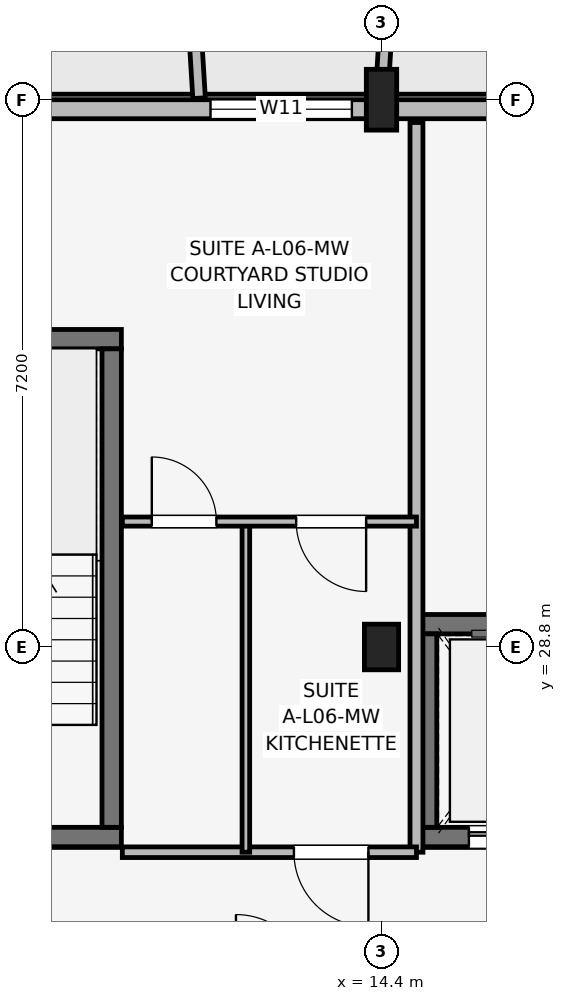
"""IFC4 building model, lengths in metres.
Left out: names, types, materials, properties, quantities, classifications, styles, units other than length and angle.
Written with IfcOpenShell. Run it as: python <this file> out.ifc"""

import sys

from ifc_helpers import new_model, si_unit, direction, frame, frame_2d, origin, origin_2d, place, context, subcontext, project, spatial, rectangle, extrude, element, fill, save


model = new_model("IFC4")
c1 = context("Model", 3, precision=1e-05, world=origin(), true_north=direction((0.0, 1.0)))
c2 = subcontext(c1, "Body", "Model", "MODEL_VIEW")
j1 = project(units=[si_unit("LENGTHUNIT", "METRE"), si_unit("PLANEANGLEUNIT", "RADIAN")], contexts=[c1])
p1 = place(None, origin())
s1 = spatial("IfcSite", under=j1, at=p1, CompositionType="ELEMENT")
p2 = place(p1, origin())
s2 = spatial("IfcBuilding", under=s1, at=p2, CompositionType="ELEMENT")
p3 = place(p2, frame((0.0, 0.0, 21.3)))
s3 = spatial("IfcBuildingStorey", under=s2, at=p3, CompositionType="ELEMENT", Elevation=21.3)
p4 = place(p3, frame((14.4, 28.8, 0.0), z_axis=(0.0, 0.0, 1.0), x_axis=(1.0, 0.0, 0.0)))
e1 = element("IfcColumn", 1, at=p4, inside=s3, PredefinedType="COLUMN", context=c2, shape_type="SweptSolid", body=[
    extrude(rectangle(XDim=0.45, YDim=0.6, at=origin_2d()), origin(), (0.0, 0.0, 1.0), 3.15),
])
p5 = place(p3, frame((14.4, 36.0, 0.0), z_axis=(0.0, 0.0, 1.0), x_axis=(1.0, 0.0, 0.0)))
e2 = element("IfcColumn", 2, at=p5, inside=s3, PredefinedType="COLUMN", context=c2, shape_type="SweptSolid", body=[
    extrude(rectangle(XDim=0.4, YDim=0.8, at=origin_2d()), origin(), (0.0, 0.0, 1.0), 3.15),
])
p6 = place(p3, frame((7.673, 26.3, 0.0), z_axis=(0.0, 0.0, 1.0), x_axis=(1.0, 0.0, 0.0)))
e3 = element("IfcWall", 3, at=p6, inside=s3, PredefinedType="SHEAR", context=c2, shape_type="SweptSolid", body=[
    extrude(rectangle(XDim=3.305, YDim=0.255, at=frame_2d((1.652, 0.0))), origin(), (0.0, 0.0, 1.0), 3.15),
])
p7 = place(p6, frame((2.177, 0.0, 0.0), z_axis=(0.0, 0.0, 1.0), x_axis=(-1.0, 0.0, 0.0)))
e4 = element("IfcOpeningElement", 4, at=p7, cuts=e3, PredefinedType="OPENING", context=c2, shape_type="SweptSolid", body=[
    extrude(rectangle(XDim=1.05, YDim=2.12, at=frame_2d((0.525, 1.06))), frame((0.0, 0.137, 0.0), z_axis=(0.0, -1.0, 0.0), x_axis=(1.0, 0.0, 0.0)), (0.0, 0.0, 1.0), 0.275),
])
p8 = place(p3, frame((7.673, 32.85, 0.0), z_axis=(0.0, 0.0, 1.0), x_axis=(1.0, 0.0, 0.0)))
e5 = element("IfcWall", 5, at=p8, inside=s3, PredefinedType="SHEAR", context=c2, shape_type="SweptSolid", body=[
    extrude(rectangle(XDim=3.305, YDim=0.255, at=frame_2d((1.652, 0.0))), origin(), (0.0, 0.0, 1.0), 3.15),
])
p9 = place(p3, frame((10.85, 26.427, 0.0), z_axis=(0.0, 0.0, 1.0), x_axis=(0.0, 1.0, 0.0)))
e6 = element("IfcWall", 6, at=p9, inside=s3, PredefinedType="SHEAR", context=c2, shape_type="SweptSolid", body=[
    extrude(rectangle(XDim=6.295, YDim=0.255, at=frame_2d((3.147, 0.0))), origin(), (0.0, 0.0, 1.0), 3.15),
])
p10 = place(p3, frame((14.873, 26.3, 0.0), z_axis=(0.0, 0.0, 1.0), x_axis=(1.0, 0.0, 0.0)))
e7 = element("IfcWall", 7, at=p10, inside=s3, PredefinedType="SHEAR", context=c2, shape_type="SweptSolid", body=[
    extrude(rectangle(XDim=2.455, YDim=0.255, at=frame_2d((1.228, 0.0))), origin(), (0.0, 0.0, 1.0), 3.15),
])
p11 = place(p10, frame((0.677, 0.0, 0.0)))
e8 = element("IfcOpeningElement", 8, at=p11, cuts=e7, PredefinedType="OPENING", context=c2, shape_type="SweptSolid", body=[
    extrude(rectangle(XDim=1.1, YDim=2.15, at=frame_2d((0.55, 1.075))), frame((0.0, 0.137, 0.0), z_axis=(0.0, -1.0, 0.0), x_axis=(1.0, 0.0, 0.0)), (0.0, 0.0, 1.0), 0.275),
])
p12 = place(p3, frame((14.873, 29.1, 0.0), z_axis=(0.0, 0.0, 1.0), x_axis=(1.0, 0.0, 0.0)))
e9 = element("IfcWall", 9, at=p12, inside=s3, PredefinedType="SHEAR", context=c2, shape_type="SweptSolid", body=[
    extrude(rectangle(XDim=2.455, YDim=0.255, at=frame_2d((1.228, 0.0))), origin(), (0.0, 0.0, 1.0), 3.15),
])
p13 = place(p3, frame((15.0, 26.427, 0.0), z_axis=(0.0, 0.0, 1.0), x_axis=(0.0, 1.0, 0.0)))
e10 = element("IfcWall", 10, at=p13, inside=s3, PredefinedType="SHEAR", context=c2, shape_type="SweptSolid", body=[
    extrude(rectangle(XDim=2.545, YDim=0.255, at=frame_2d((1.272, 0.0))), origin(), (0.0, 0.0, 1.0), 3.15),
])
p14 = place(p3, frame((32.6, 35.875, 0.0), z_axis=(0.0, 0.0, 1.0), x_axis=(-1.0, 0.0, 0.0)))
e11 = element("IfcWall", 11, at=p14, inside=s3, PredefinedType="SOLIDWALL", context=c2, shape_type="SweptSolid", body=[
    extrude(rectangle(XDim=29.2, YDim=0.25, at=frame_2d((14.6, 0.0))), origin(), (0.0, 0.0, 1.0), 2.43),
])
p15 = place(p14, frame((27.55, 0.0, 0.0), z_axis=(0.0, 0.0, 1.0), x_axis=(-1.0, 0.0, 0.0)))
e12 = element("IfcOpeningElement", 12, at=p15, cuts=e11, PredefinedType="OPENING", context=c2, shape_type="SweptSolid", body=[
    extrude(rectangle(XDim=1.5, YDim=2.15, at=frame_2d((0.75, 1.075))), frame((0.0, 0.135, 0.0), z_axis=(0.0, -1.0, 0.0), x_axis=(1.0, 0.0, 0.0)), (0.0, 0.0, 1.0), 0.27),
])
p16 = place(p14, frame((3.15, 0.0, 0.0), z_axis=(0.0, 0.0, 1.0), x_axis=(-1.0, 0.0, 0.0)))
e13 = element("IfcOpeningElement", 13, at=p16, cuts=e11, PredefinedType="OPENING", context=c2, shape_type="SweptSolid", body=[
    extrude(rectangle(XDim=1.5, YDim=2.15, at=frame_2d((0.75, 1.075))), frame((0.0, 0.135, 0.0), z_axis=(0.0, -1.0, 0.0), x_axis=(1.0, 0.0, 0.0)), (0.0, 0.0, 1.0), 0.27),
])
p17 = place(p14, frame((14.225, 0.0, 0.5)))
e14 = element("IfcOpeningElement", 14, at=p17, cuts=e11, PredefinedType="OPENING", context=c2, shape_type="SweptSolid", body=[
    extrude(rectangle(XDim=0.75, YDim=1.75, at=frame_2d((0.375, 0.875))), frame((0.0, 0.135, 0.0), z_axis=(0.0, -1.0, 0.0), x_axis=(1.0, 0.0, 0.0)), (0.0, 0.0, 1.0), 0.27),
])
p18 = place(p14, frame((8.82, 0.0, 0.7)))
e15 = element("IfcOpeningElement", 15, at=p18, cuts=e11, PredefinedType="OPENING", context=c2, shape_type="SweptSolid", body=[
    extrude(rectangle(XDim=1.72, YDim=1.6, at=frame_2d((0.86, 0.8))), frame((0.0, 0.135, 0.0), z_axis=(0.0, -1.0, 0.0), x_axis=(1.0, 0.0, 0.0)), (0.0, 0.0, 1.0), 0.27),
])
p19 = place(p14, frame((18.59, 0.0, 0.7)))
e16 = element("IfcOpeningElement", 16, at=p19, cuts=e11, PredefinedType="OPENING", context=c2, shape_type="SweptSolid", body=[
    extrude(rectangle(XDim=1.86, YDim=1.6, at=frame_2d((0.93, 0.8))), frame((0.0, 0.135, 0.0), z_axis=(0.0, -1.0, 0.0), x_axis=(1.0, 0.0, 0.0)), (0.0, 0.0, 1.0), 0.27),
])
p20 = place(p3, frame((12.0, 36.02, 0.0), z_axis=(0.0, 0.0, 1.0), x_axis=(-0.061170732449, 0.998127317276, 0.0)))
e17 = element("IfcWall", 17, at=p20, inside=s3, PredefinedType="ELEMENTEDWALL", context=c2, shape_type="SweptSolid", body=[
    extrude(rectangle(XDim=1.964, YDim=0.165, at=frame_2d((0.982, 0.0))), origin(), (0.0, 0.0, 1.0), 2.48),
])
p21 = place(p3, frame((14.4, 36.02, 0.0), z_axis=(0.0, 0.0, 1.0), x_axis=(0.061170732449, 0.998127317276, 0.0)))
e18 = element("IfcWall", 18, at=p21, inside=s3, PredefinedType="ELEMENTEDWALL", context=c2, shape_type="SweptSolid", body=[
    extrude(rectangle(XDim=1.964, YDim=0.165, at=frame_2d((0.982, 0.0))), origin(), (0.0, 0.0, 1.0), 2.53),
])
p22 = place(p3, frame((14.86, 26.1, 0.0), z_axis=(0.0, 0.0, 1.0), x_axis=(0.0, 1.0, 0.0)))
e19 = element("IfcWall", 19, at=p22, inside=s3, PredefinedType="PARTITIONING", context=c2, shape_type="SweptSolid", body=[
    extrude(rectangle(XDim=9.6, YDim=0.17, at=frame_2d((4.8, 0.0))), origin(), (0.0, 0.0, 1.0), 2.38),
])
p23 = place(p3, frame((10.99, 26.1, 0.0), z_axis=(0.0, 0.0, 1.0), x_axis=(1.0, 0.0, 0.0)))
e20 = element("IfcWall", 20, at=p23, inside=s3, PredefinedType="PARTITIONING", context=c2, shape_type="SweptSolid", body=[
    extrude(rectangle(XDim=3.87, YDim=0.14, at=frame_2d((1.935, 0.0))), origin(), (0.0, 0.0, 1.0), 2.38),
])
p24 = place(p23, frame((3.238, 0.0, 0.0), z_axis=(0.0, 0.0, 1.0), x_axis=(-1.0, 0.0, 0.0)))
e21 = element("IfcOpeningElement", 21, at=p24, cuts=e20, PredefinedType="OPENING", context=c2, shape_type="SweptSolid", body=[
    extrude(rectangle(XDim=0.98, YDim=2.1, at=frame_2d((0.49, 1.05))), frame((0.0, 0.08, 0.0), z_axis=(0.0, -1.0, 0.0), x_axis=(1.0, 0.0, 0.0)), (0.0, 0.0, 1.0), 0.16),
])
p25 = place(p3, frame((12.615, 26.1, 0.0), z_axis=(0.0, 0.0, 1.0), x_axis=(0.0, 1.0, 0.0)))
e22 = element("IfcWall", 22, at=p25, inside=s3, PredefinedType="PARTITIONING", context=c2, shape_type="SweptSolid", body=[
    extrude(rectangle(XDim=4.35, YDim=0.1, at=frame_2d((2.175, 0.0))), origin(), (0.0, 0.0, 1.0), 2.38),
])
p26 = place(p3, frame((10.99, 30.45, 0.0), z_axis=(0.0, 0.0, 1.0), x_axis=(1.0, 0.0, 0.0)))
e23 = element("IfcWall", 23, at=p26, inside=s3, PredefinedType="PARTITIONING", context=c2, shape_type="SweptSolid", body=[
    extrude(rectangle(XDim=3.87, YDim=0.12, at=frame_2d((1.935, 0.0))), origin(), (0.0, 0.0, 1.0), 2.38),
])
p27 = place(p26, frame((0.388, 0.0, 0.0)))
e24 = element("IfcOpeningElement", 24, at=p27, cuts=e23, PredefinedType="OPENING", context=c2, shape_type="SweptSolid", body=[
    extrude(rectangle(XDim=0.85, YDim=2.08, at=frame_2d((0.425, 1.04))), frame((0.0, 0.07, 0.0), z_axis=(0.0, -1.0, 0.0), x_axis=(1.0, 0.0, 0.0)), (0.0, 0.0, 1.0), 0.14),
])
p28 = place(p26, frame((3.208, 0.0, 0.0), z_axis=(0.0, 0.0, 1.0), x_axis=(-1.0, 0.0, 0.0)))
e25 = element("IfcOpeningElement", 25, at=p28, cuts=e23, PredefinedType="OPENING", context=c2, shape_type="SweptSolid", body=[
    extrude(rectangle(XDim=0.92, YDim=2.08, at=frame_2d((0.46, 1.04))), frame((0.0, 0.07, 0.0), z_axis=(0.0, -1.0, 0.0), x_axis=(1.0, 0.0, 0.0)), (0.0, 0.0, 1.0), 0.14),
])
p29 = place(p19, origin())
e26 = element("IfcWindow", 26, at=p29, inside=s3, PartitioningType="SINGLE_PANEL", PredefinedType="WINDOW", context=c2, shape_type="SweptSolid", body=[
    extrude(rectangle(XDim=1.86, YDim=1.6, at=frame_2d((0.93, 0.8))), frame((0.0, 0.03, 0.0), z_axis=(0.0, -1.0, 0.0), x_axis=(1.0, 0.0, 0.0)), (0.0, 0.0, 1.0), 0.06),
])
fill(e16, e26)
p30 = place(p24, origin())
e27 = element("IfcDoor", 27, at=p30, inside=s3, OperationType="SINGLE_SWING_RIGHT", PredefinedType="DOOR", context=c2, shape_type="SweptSolid", body=[
    extrude(rectangle(XDim=0.98, YDim=2.1, at=frame_2d((0.49, 1.05))), frame((0.0, 0.025, 0.0), z_axis=(0.0, -1.0, 0.0), x_axis=(1.0, 0.0, 0.0)), (0.0, 0.0, 1.0), 0.05),
])
fill(e21, e27)
p31 = place(p27, origin())
e28 = element("IfcDoor", 28, at=p31, inside=s3, OperationType="SINGLE_SWING_LEFT", PredefinedType="DOOR", context=c2, shape_type="SweptSolid", body=[
    extrude(rectangle(XDim=0.85, YDim=2.08, at=frame_2d((0.425, 1.04))), frame((0.0, 0.025, 0.0), z_axis=(0.0, -1.0, 0.0), x_axis=(1.0, 0.0, 0.0)), (0.0, 0.0, 1.0), 0.05),
])
fill(e24, e28)
p32 = place(p28, origin())
e29 = element("IfcDoor", 29, at=p32, inside=s3, OperationType="SINGLE_SWING_RIGHT", PredefinedType="DOOR", context=c2, shape_type="SweptSolid", body=[
    extrude(rectangle(XDim=0.92, YDim=2.08, at=frame_2d((0.46, 1.04))), frame((0.0, 0.025, 0.0), z_axis=(0.0, -1.0, 0.0), x_axis=(1.0, 0.0, 0.0)), (0.0, 0.0, 1.0), 0.05),
])
fill(e25, e29)
p33 = place(p11, origin())
e30 = element("IfcDoor", 30, at=p33, inside=s3, OperationType="SLIDING_TO_LEFT", PredefinedType="DOOR", context=c2, shape_type="SweptSolid", body=[
    extrude(rectangle(XDim=1.1, YDim=2.15, at=frame_2d((0.55, 1.075))), frame((0.0, 0.025, 0.0), z_axis=(0.0, -1.0, 0.0), x_axis=(1.0, 0.0, 0.0)), (0.0, 0.0, 1.0), 0.05),
])
fill(e8, e30)
save(model, sys.argv[1])
